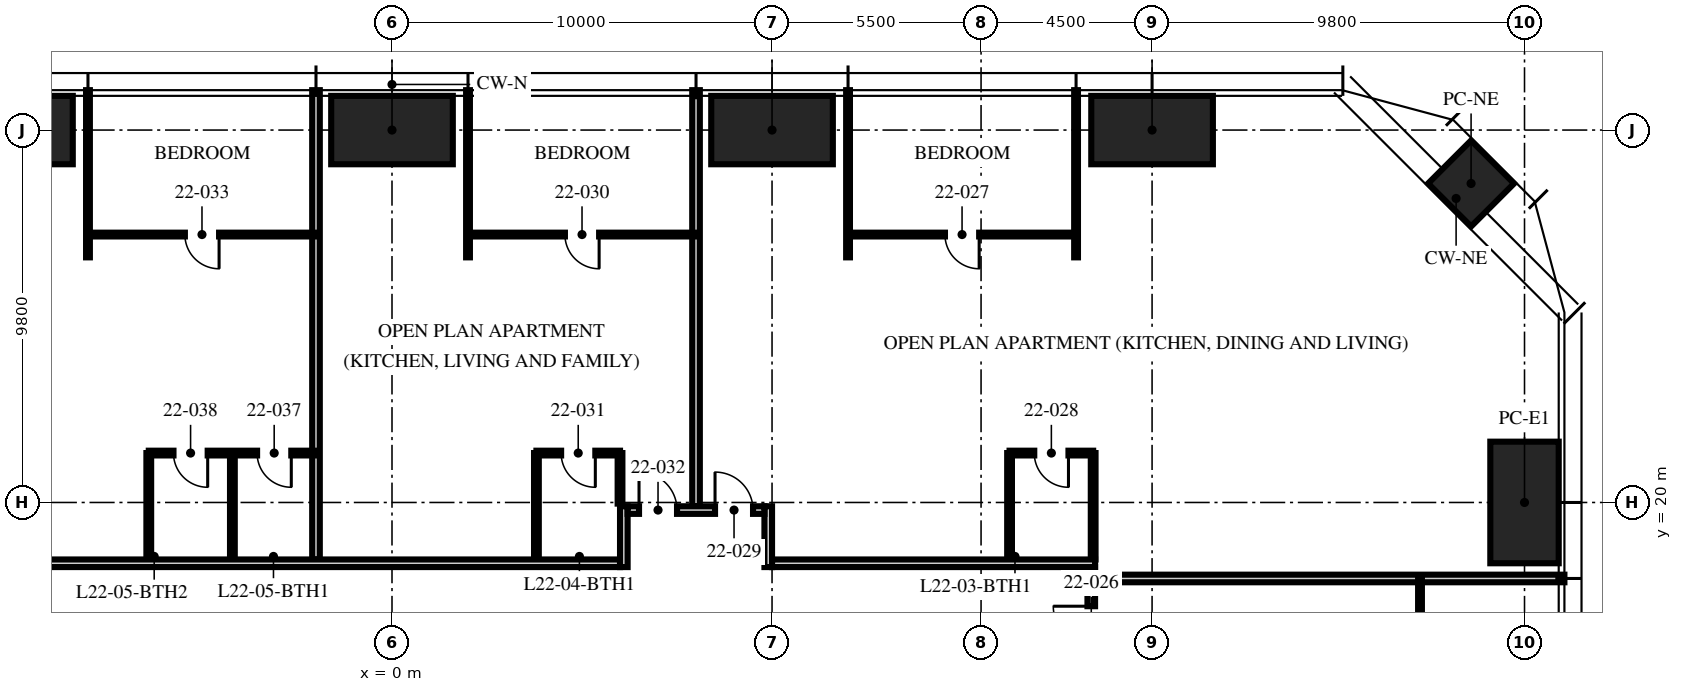
"""IFC4 building model, lengths in metres.
Left out: names, types, materials, properties, quantities, classifications, styles, units other than length and angle.
Written with IfcOpenShell. Run it as: python <this file> out.ifc"""

import sys

from ifc_helpers import new_model, si_unit, direction, frame, frame_2d, origin, origin_2d, place, context, subcontext, project, spatial, rectangle, hollow_rectangle, extrude, element, fill, save


model = new_model("IFC4")
c1 = context("Model", 3, precision=1e-05, world=origin(), true_north=direction((0.0, 1.0)))
c2 = subcontext(c1, "Body", "Model", "MODEL_VIEW")
j1 = project(units=[si_unit("LENGTHUNIT", "METRE"), si_unit("PLANEANGLEUNIT", "RADIAN")], contexts=[c1])
p1 = place(None, origin())
s1 = spatial("IfcSite", under=j1, at=p1, CompositionType="ELEMENT")
p2 = place(p1, origin())
s2 = spatial("IfcBuilding", under=s1, at=p2, CompositionType="ELEMENT")
p3 = place(p2, frame((0.0, 0.0, 88.5)))
s3 = spatial("IfcBuildingStorey", under=s2, at=p3, CompositionType="ELEMENT", Elevation=88.5)
for number, where, z_axis, x_axis in (
    (1, (-10.0, 29.8, 0.0), (0.0, 0.0, 1.0), (1.0, 0.0, 0.0)),
    (2, (0.0, 29.8, 0.0), (0.0, 0.0, 1.0), (1.0, 0.0, 0.0)),
    (3, (10.0, 29.8, 0.0), (0.0, 0.0, 1.0), (1.0, 0.0, 0.0)),
    (4, (20.0, 29.8, 0.0), (0.0, 0.0, 1.0), (1.0, 0.0, 0.0)),
    (5, (29.8, 20.0, 0.0), (0.0, 0.0, 1.0), (0.0, 1.0, 0.0)),
):
    element("IfcColumn", number, at=place(p3, frame(where, z_axis=z_axis, x_axis=x_axis)), inside=s3, PredefinedType="COLUMN", context=c2, shape_type="SweptSolid", body=[
        extrude(hollow_rectangle(XDim=3.2, YDim=1.8, WallThickness=0.2, at=origin_2d()), origin(), (0.0, 0.0, 1.0), 3.75),
    ])
p4 = place(p3, frame((28.394, 28.394, 0.0), z_axis=(0.0, 0.0, 1.0), x_axis=(0.707106781187, -0.707106781187, 0.0)))
e6 = element("IfcColumn", 6, at=p4, inside=s3, PredefinedType="COLUMN", context=c2, shape_type="SweptSolid", body=[
    extrude(hollow_rectangle(XDim=1.6, YDim=1.6, WallThickness=0.1, at=origin_2d()), origin(), (0.0, 0.0, 1.0), 3.75),
])
p5 = place(p3, frame((18.5, 18.0, 0.0), z_axis=(0.0, 0.0, 1.0), x_axis=(1.0, 0.0, 0.0)))
e7 = element("IfcWall", 7, at=p5, inside=s3, PredefinedType="PARTITIONING", context=c2, shape_type="SweptSolid", body=[
    extrude(rectangle(XDim=12.35, YDim=0.2, at=frame_2d((6.175, 0.0))), origin(), (0.0, 0.0, 1.0), 2.3),
])
for number, where, z_axis, x_axis in (
    (8, (18.0, 26.45, 0.0), (0.0, 0.0, 1.0), (0.0, 1.0, 0.0)),
    (9, (12.0, 26.45, 0.0), (0.0, 0.0, 1.0), (0.0, 1.0, 0.0)),
):
    element("IfcWall", number, at=place(p3, frame(where, z_axis=z_axis, x_axis=x_axis)), inside=s3, PredefinedType="PARTITIONING", context=c2, shape_type="SweptSolid", body=[
        extrude(rectangle(XDim=4.4, YDim=0.1, at=frame_2d((2.2, 0.0))), origin(), (0.0, 0.0, 1.0), 2.71),
    ])
p6 = place(p3, frame((8.0, 19.9, 0.0), z_axis=(0.0, 0.0, 1.0), x_axis=(0.0, 1.0, 0.0)))
e10 = element("IfcWall", 10, at=p6, inside=s3, PredefinedType="PARTITIONING", context=c2, shape_type="SweptSolid", body=[
    extrude(rectangle(XDim=10.95, YDim=0.2, at=frame_2d((5.475, 0.0))), origin(), (0.0, 0.0, 1.0), 2.71),
])
p7 = place(p3, frame((2.0, 26.45, 0.0), z_axis=(0.0, 0.0, 1.0), x_axis=(0.0, 1.0, 0.0)))
e11 = element("IfcWall", 11, at=p7, inside=s3, PredefinedType="PARTITIONING", context=c2, shape_type="SweptSolid", body=[
    extrude(rectangle(XDim=4.4, YDim=0.1, at=frame_2d((2.2, 0.0))), origin(), (0.0, 0.0, 1.0), 2.71),
])
p8 = place(p3, frame((-2.0, 18.5, 0.0), z_axis=(0.0, 0.0, 1.0), x_axis=(0.0, 1.0, 0.0)))
e12 = element("IfcWall", 12, at=p8, inside=s3, PredefinedType="PARTITIONING", context=c2, shape_type="SweptSolid", body=[
    extrude(rectangle(XDim=12.35, YDim=0.2, at=frame_2d((6.175, 0.0))), origin(), (0.0, 0.0, 1.0), 2.71),
])
p9 = place(p3, frame((-8.0, 26.45, 0.0), z_axis=(0.0, 0.0, 1.0), x_axis=(0.0, 1.0, 0.0)))
e13 = element("IfcWall", 13, at=p9, inside=s3, PredefinedType="PARTITIONING", context=c2, shape_type="SweptSolid", body=[
    extrude(rectangle(XDim=4.4, YDim=0.1, at=frame_2d((2.2, 0.0))), origin(), (0.0, 0.0, 1.0), 2.71),
])
p10 = place(p3, frame((27.05, 12.0, 0.0), z_axis=(0.0, 0.0, 1.0), x_axis=(0.0, 1.0, 0.0)))
e14 = element("IfcWall", 14, at=p10, inside=s3, PredefinedType="PARTITIONING", context=c2, shape_type="SweptSolid", body=[
    extrude(rectangle(XDim=6.0, YDim=0.1, at=frame_2d((3.0, 0.0))), origin(), (0.0, 0.0, 1.0), 2.61),
])
p11 = place(p10, frame((2.55, 0.0, 0.0)))
e15 = element("IfcOpeningElement", 15, at=p11, cuts=e14, PredefinedType="OPENING", context=c2, shape_type="SweptSolid", body=[
    extrude(rectangle(XDim=0.9, YDim=2.1, at=frame_2d((0.45, 1.05))), frame((0.0, 0.06, 0.0), z_axis=(0.0, -1.0, 0.0), x_axis=(1.0, 0.0, 0.0)), (0.0, 0.0, 1.0), 0.12),
])
p12 = place(p3, frame((18.0, 27.05, 0.0), z_axis=(0.0, 0.0, 1.0), x_axis=(-1.0, 0.0, 0.0)))
e16 = element("IfcWall", 16, at=p12, inside=s3, PredefinedType="PARTITIONING", context=c2, shape_type="SweptSolid", body=[
    extrude(rectangle(XDim=6.0, YDim=0.1, at=frame_2d((3.0, 0.0))), origin(), (0.0, 0.0, 1.0), 2.61),
])
p13 = place(p12, frame((2.55, 0.0, 0.0)))
e17 = element("IfcOpeningElement", 17, at=p13, cuts=e16, PredefinedType="OPENING", context=c2, shape_type="SweptSolid", body=[
    extrude(rectangle(XDim=0.9, YDim=2.1, at=frame_2d((0.45, 1.05))), frame((0.0, 0.06, 0.0), z_axis=(0.0, -1.0, 0.0), x_axis=(1.0, 0.0, 0.0)), (0.0, 0.0, 1.0), 0.12),
])
p14 = place(p3, frame((18.45, 21.3, 0.0), z_axis=(0.0, 0.0, 1.0), x_axis=(-1.0, 0.0, 0.0)))
e18 = element("IfcWall", 18, at=p14, inside=s3, PredefinedType="PARTITIONING", context=c2, shape_type="SweptSolid", body=[
    extrude(rectangle(XDim=2.2, YDim=0.125, at=frame_2d((1.1, 0.0))), origin(), (0.0, 0.0, 1.0), 3.5),
])
p15 = place(p14, frame((0.65, 0.0, 0.0)))
e19 = element("IfcOpeningElement", 19, at=p15, cuts=e18, PredefinedType="OPENING", context=c2, shape_type="SweptSolid", body=[
    extrude(rectangle(XDim=0.9, YDim=2.1, at=frame_2d((0.45, 1.05))), frame((0.0, 0.073, 0.0), z_axis=(0.0, -1.0, 0.0), x_axis=(1.0, 0.0, 0.0)), (0.0, 0.0, 1.0), 0.145),
])
p16 = place(p3, frame((18.45, 18.5, 0.0), z_axis=(0.0, 0.0, 1.0), x_axis=(0.0, 1.0, 0.0)))
e20 = element("IfcWall", 20, at=p16, inside=s3, PredefinedType="PARTITIONING", context=c2, shape_type="SweptSolid", body=[
    extrude(rectangle(XDim=2.8, YDim=0.125, at=frame_2d((1.4, 0.0))), origin(), (0.0, 0.0, 1.0), 2.3),
])
p17 = place(p3, frame((16.25, 18.5, 0.0), z_axis=(0.0, 0.0, 1.0), x_axis=(0.0, 1.0, 0.0)))
e21 = element("IfcWall", 21, at=p17, inside=s3, PredefinedType="PARTITIONING", context=c2, shape_type="SweptSolid", body=[
    extrude(rectangle(XDim=2.8, YDim=0.125, at=frame_2d((1.4, 0.0))), origin(), (0.0, 0.0, 1.0), 3.5),
])
p18 = place(p3, frame((8.0, 27.05, 0.0), z_axis=(0.0, 0.0, 1.0), x_axis=(-1.0, 0.0, 0.0)))
e22 = element("IfcWall", 22, at=p18, inside=s3, PredefinedType="PARTITIONING", context=c2, shape_type="SweptSolid", body=[
    extrude(rectangle(XDim=6.0, YDim=0.1, at=frame_2d((3.0, 0.0))), origin(), (0.0, 0.0, 1.0), 2.61),
])
p19 = place(p18, frame((2.55, 0.0, 0.0)))
e23 = element("IfcOpeningElement", 23, at=p19, cuts=e22, PredefinedType="OPENING", context=c2, shape_type="SweptSolid", body=[
    extrude(rectangle(XDim=0.9, YDim=2.1, at=frame_2d((0.45, 1.05))), frame((0.0, 0.06, 0.0), z_axis=(0.0, -1.0, 0.0), x_axis=(1.0, 0.0, 0.0)), (0.0, 0.0, 1.0), 0.12),
])
p20 = place(p3, frame((6.0, 21.3, 0.0), z_axis=(0.0, 0.0, 1.0), x_axis=(-1.0, 0.0, 0.0)))
e24 = element("IfcWall", 24, at=p20, inside=s3, PredefinedType="PARTITIONING", context=c2, shape_type="SweptSolid", body=[
    extrude(rectangle(XDim=2.2, YDim=0.125, at=frame_2d((1.1, 0.0))), origin(), (0.0, 0.0, 1.0), 2.61),
])
p21 = place(p20, frame((0.65, 0.0, 0.0)))
e25 = element("IfcOpeningElement", 25, at=p21, cuts=e24, PredefinedType="OPENING", context=c2, shape_type="SweptSolid", body=[
    extrude(rectangle(XDim=0.9, YDim=2.1, at=frame_2d((0.45, 1.05))), frame((0.0, 0.073, 0.0), z_axis=(0.0, -1.0, 0.0), x_axis=(1.0, 0.0, 0.0)), (0.0, 0.0, 1.0), 0.145),
])
p22 = place(p3, frame((6.0, 19.97, 0.0), z_axis=(0.0, 0.0, 1.0), x_axis=(0.0, 1.0, 0.0)))
e26 = element("IfcWall", 26, at=p22, inside=s3, PredefinedType="PARTITIONING", context=c2, shape_type="SweptSolid", body=[
    extrude(rectangle(XDim=1.33, YDim=0.125, at=frame_2d((0.665, 0.0))), origin(), (0.0, 0.0, 1.0), 3.5),
])
p23 = place(p3, frame((3.8, 18.5, 0.0), z_axis=(0.0, 0.0, 1.0), x_axis=(0.0, 1.0, 0.0)))
e27 = element("IfcWall", 27, at=p23, inside=s3, PredefinedType="PARTITIONING", context=c2, shape_type="SweptSolid", body=[
    extrude(rectangle(XDim=2.8, YDim=0.125, at=frame_2d((1.4, 0.0))), origin(), (0.0, 0.0, 1.0), 3.5),
])
p24 = place(p3, frame((-2.0, 27.05, 0.0), z_axis=(0.0, 0.0, 1.0), x_axis=(-1.0, 0.0, 0.0)))
e28 = element("IfcWall", 28, at=p24, inside=s3, PredefinedType="PARTITIONING", context=c2, shape_type="SweptSolid", body=[
    extrude(rectangle(XDim=6.0, YDim=0.1, at=frame_2d((3.0, 0.0))), origin(), (0.0, 0.0, 1.0), 2.61),
])
p25 = place(p24, frame((2.55, 0.0, 0.0)))
e29 = element("IfcOpeningElement", 29, at=p25, cuts=e28, PredefinedType="OPENING", context=c2, shape_type="SweptSolid", body=[
    extrude(rectangle(XDim=0.9, YDim=2.1, at=frame_2d((0.45, 1.05))), frame((0.0, 0.06, 0.0), z_axis=(0.0, -1.0, 0.0), x_axis=(1.0, 0.0, 0.0)), (0.0, 0.0, 1.0), 0.12),
])
p26 = place(p3, frame((-2.0, 21.3, 0.0), z_axis=(0.0, 0.0, 1.0), x_axis=(-1.0, 0.0, 0.0)))
e30 = element("IfcWall", 30, at=p26, inside=s3, PredefinedType="PARTITIONING", context=c2, shape_type="SweptSolid", body=[
    extrude(rectangle(XDim=4.4, YDim=0.125, at=frame_2d((2.2, 0.0))), origin(), (0.0, 0.0, 1.0), 2.61),
])
p27 = place(p26, frame((0.65, 0.0, 0.0)))
e31 = element("IfcOpeningElement", 31, at=p27, cuts=e30, PredefinedType="OPENING", context=c2, shape_type="SweptSolid", body=[
    extrude(rectangle(XDim=0.9, YDim=2.1, at=frame_2d((0.45, 1.05))), frame((0.0, 0.073, 0.0), z_axis=(0.0, -1.0, 0.0), x_axis=(1.0, 0.0, 0.0)), (0.0, 0.0, 1.0), 0.145),
])
p28 = place(p26, frame((2.85, 0.0, 0.0)))
e32 = element("IfcOpeningElement", 32, at=p28, cuts=e30, PredefinedType="OPENING", context=c2, shape_type="SweptSolid", body=[
    extrude(rectangle(XDim=0.9, YDim=2.1, at=frame_2d((0.45, 1.05))), frame((0.0, 0.073, 0.0), z_axis=(0.0, -1.0, 0.0), x_axis=(1.0, 0.0, 0.0)), (0.0, 0.0, 1.0), 0.145),
])
for number, where, z_axis, x_axis in (
    (33, (-4.2, 18.5, 0.0), (0.0, 0.0, 1.0), (0.0, 1.0, 0.0)),
    (34, (-6.4, 18.5, 0.0), (0.0, 0.0, 1.0), (0.0, 1.0, 0.0)),
):
    element("IfcWall", number, at=place(p3, frame(where, z_axis=z_axis, x_axis=x_axis)), inside=s3, PredefinedType="PARTITIONING", context=c2, shape_type="SweptSolid", body=[
        extrude(rectangle(XDim=2.8, YDim=0.125, at=frame_2d((1.4, 0.0))), origin(), (0.0, 0.0, 1.0), 3.5),
    ])
p29 = place(p3, frame((18.4, -6.0, 0.0), z_axis=(0.0, 0.0, 1.0), x_axis=(0.0, 1.0, 0.0)))
e35 = element("IfcWall", 35, at=p29, inside=s3, PredefinedType="PARTITIONING", context=c2, shape_type="SweptSolid", body=[
    extrude(rectangle(XDim=24.3, YDim=0.2, at=frame_2d((12.15, 0.0))), origin(), (0.0, 0.0, 1.0), 2.3),
])
p30 = place(p29, frame((22.27, 0.0, 0.0)))
e36 = element("IfcOpeningElement", 36, at=p30, cuts=e35, PredefinedType="OPENING", context=c2, shape_type="SweptSolid", body=[
    extrude(rectangle(XDim=1.0, YDim=2.2, at=frame_2d((0.5, 1.1))), frame((0.0, 0.11, 0.0), z_axis=(0.0, -1.0, 0.0), x_axis=(1.0, 0.0, 0.0)), (0.0, 0.0, 1.0), 0.22),
])
p31 = place(p3, frame((-18.5, 18.4, 0.0), z_axis=(0.0, 0.0, 1.0), x_axis=(1.0, 0.0, 0.0)))
e37 = element("IfcWall", 37, at=p31, inside=s3, PredefinedType="PARTITIONING", context=c2, shape_type="SweptSolid", body=[
    extrude(rectangle(XDim=24.5, YDim=0.2, at=frame_2d((12.25, 0.0))), origin(), (0.0, 0.0, 1.0), 2.3),
])
p32 = place(p3, frame((6.1, 18.3, 0.0), z_axis=(0.0, 0.0, 1.0), x_axis=(0.0, 1.0, 0.0)))
e38 = element("IfcWall", 38, at=p32, inside=s3, PredefinedType="PARTITIONING", context=c2, shape_type="SweptSolid", body=[
    extrude(rectangle(XDim=1.6, YDim=0.2, at=frame_2d((0.8, 0.0))), origin(), (0.0, 0.0, 1.0), 3.5),
])
p33 = place(p3, frame((9.9, 18.3, 0.0), z_axis=(0.0, 0.0, 1.0), x_axis=(0.0, 1.0, 0.0)))
e39 = element("IfcWall", 39, at=p33, inside=s3, PredefinedType="PARTITIONING", context=c2, shape_type="SweptSolid", body=[
    extrude(rectangle(XDim=1.6, YDim=0.2, at=frame_2d((0.8, 0.0))), origin(), (0.0, 0.0, 1.0), 2.492),
])
p34 = place(p3, frame((6.2, 19.8, 0.0), z_axis=(0.0, 0.0, 1.0), x_axis=(1.0, 0.0, 0.0)))
e40 = element("IfcWall", 40, at=p34, inside=s3, PredefinedType="PARTITIONING", context=c2, shape_type="SweptSolid", body=[
    extrude(rectangle(XDim=3.6, YDim=0.2, at=frame_2d((1.8, 0.0))), origin(), (0.0, 0.0, 1.0), 3.5),
])
p35 = place(p34, frame((2.3, 0.0, 0.0)))
e41 = element("IfcOpeningElement", 41, at=p35, cuts=e40, PredefinedType="OPENING", context=c2, shape_type="SweptSolid", body=[
    extrude(rectangle(XDim=1.0, YDim=2.2, at=frame_2d((0.5, 1.1))), frame((0.0, 0.11, 0.0), z_axis=(0.0, -1.0, 0.0), x_axis=(1.0, 0.0, 0.0)), (0.0, 0.0, 1.0), 0.22),
])
p36 = place(p34, frame((0.3, 0.0, 0.0)))
e42 = element("IfcOpeningElement", 42, at=p36, cuts=e40, PredefinedType="OPENING", context=c2, shape_type="SweptSolid", body=[
    extrude(rectangle(XDim=1.0, YDim=2.2, at=frame_2d((0.5, 1.1))), frame((0.0, 0.11, 0.0), z_axis=(0.0, -1.0, 0.0), x_axis=(1.0, 0.0, 0.0)), (0.0, 0.0, 1.0), 0.22),
])
p37 = place(p3, frame((10.0, 18.4, 0.0), z_axis=(0.0, 0.0, 1.0), x_axis=(1.0, 0.0, 0.0)))
e43 = element("IfcWall", 43, at=p37, inside=s3, PredefinedType="PARTITIONING", context=c2, shape_type="SweptSolid", body=[
    extrude(rectangle(XDim=8.5, YDim=0.2, at=frame_2d((4.25, 0.0))), origin(), (0.0, 0.0, 1.0), 2.3),
])
p38 = place(p30, origin())
e44 = element("IfcDoor", 44, at=p38, inside=s3, OperationType="SINGLE_SWING_RIGHT", PredefinedType="DOOR", context=c2, shape_type="SweptSolid", body=[
    extrude(rectangle(XDim=1.0, YDim=2.2, at=frame_2d((0.5, 1.1))), frame((0.0, 0.025, 0.0), z_axis=(0.0, -1.0, 0.0), x_axis=(1.0, 0.0, 0.0)), (0.0, 0.0, 1.0), 0.05),
])
fill(e36, e44)
p39 = place(p13, origin())
e45 = element("IfcDoor", 45, at=p39, inside=s3, OperationType="SINGLE_SWING_LEFT", PredefinedType="DOOR", context=c2, shape_type="SweptSolid", body=[
    extrude(rectangle(XDim=0.9, YDim=2.1, at=frame_2d((0.45, 1.05))), frame((0.0, 0.025, 0.0), z_axis=(0.0, -1.0, 0.0), x_axis=(1.0, 0.0, 0.0)), (0.0, 0.0, 1.0), 0.05),
])
fill(e17, e45)
p40 = place(p15, origin())
e46 = element("IfcDoor", 46, at=p40, inside=s3, OperationType="SINGLE_SWING_LEFT", PredefinedType="DOOR", context=c2, shape_type="SweptSolid", body=[
    extrude(rectangle(XDim=0.9, YDim=2.1, at=frame_2d((0.45, 1.05))), frame((0.0, 0.025, 0.0), z_axis=(0.0, -1.0, 0.0), x_axis=(1.0, 0.0, 0.0)), (0.0, 0.0, 1.0), 0.05),
])
fill(e19, e46)
p41 = place(p35, origin())
e47 = element("IfcDoor", 47, at=p41, inside=s3, OperationType="SINGLE_SWING_LEFT", PredefinedType="DOOR", context=c2, shape_type="SweptSolid", body=[
    extrude(rectangle(XDim=1.0, YDim=2.2, at=frame_2d((0.5, 1.1))), frame((0.0, 0.025, 0.0), z_axis=(0.0, -1.0, 0.0), x_axis=(1.0, 0.0, 0.0)), (0.0, 0.0, 1.0), 0.05),
])
fill(e41, e47)
p42 = place(p19, origin())
e48 = element("IfcDoor", 48, at=p42, inside=s3, OperationType="SINGLE_SWING_LEFT", PredefinedType="DOOR", context=c2, shape_type="SweptSolid", body=[
    extrude(rectangle(XDim=0.9, YDim=2.1, at=frame_2d((0.45, 1.05))), frame((0.0, 0.025, 0.0), z_axis=(0.0, -1.0, 0.0), x_axis=(1.0, 0.0, 0.0)), (0.0, 0.0, 1.0), 0.05),
])
fill(e23, e48)
p43 = place(p21, origin())
e49 = element("IfcDoor", 49, at=p43, inside=s3, OperationType="SINGLE_SWING_LEFT", PredefinedType="DOOR", context=c2, shape_type="SweptSolid", body=[
    extrude(rectangle(XDim=0.9, YDim=2.1, at=frame_2d((0.45, 1.05))), frame((0.0, 0.025, 0.0), z_axis=(0.0, -1.0, 0.0), x_axis=(1.0, 0.0, 0.0)), (0.0, 0.0, 1.0), 0.05),
])
fill(e25, e49)
p44 = place(p36, origin())
e50 = element("IfcDoor", 50, at=p44, inside=s3, OperationType="SINGLE_SWING_LEFT", PredefinedType="DOOR", context=c2, shape_type="SweptSolid", body=[
    extrude(rectangle(XDim=1.0, YDim=2.2, at=frame_2d((0.5, 1.1))), frame((0.0, 0.025, 0.0), z_axis=(0.0, -1.0, 0.0), x_axis=(1.0, 0.0, 0.0)), (0.0, 0.0, 1.0), 0.05),
])
fill(e42, e50)
p45 = place(p25, origin())
e51 = element("IfcDoor", 51, at=p45, inside=s3, OperationType="SINGLE_SWING_LEFT", PredefinedType="DOOR", context=c2, shape_type="SweptSolid", body=[
    extrude(rectangle(XDim=0.9, YDim=2.1, at=frame_2d((0.45, 1.05))), frame((0.0, 0.025, 0.0), z_axis=(0.0, -1.0, 0.0), x_axis=(1.0, 0.0, 0.0)), (0.0, 0.0, 1.0), 0.05),
])
fill(e29, e51)
p46 = place(p27, origin())
e52 = element("IfcDoor", 52, at=p46, inside=s3, OperationType="SINGLE_SWING_LEFT", PredefinedType="DOOR", context=c2, shape_type="SweptSolid", body=[
    extrude(rectangle(XDim=0.9, YDim=2.1, at=frame_2d((0.45, 1.05))), frame((0.0, 0.025, 0.0), z_axis=(0.0, -1.0, 0.0), x_axis=(1.0, 0.0, 0.0)), (0.0, 0.0, 1.0), 0.05),
])
fill(e31, e52)
p47 = place(p28, origin())
e53 = element("IfcDoor", 53, at=p47, inside=s3, OperationType="SINGLE_SWING_LEFT", PredefinedType="DOOR", context=c2, shape_type="SweptSolid", body=[
    extrude(rectangle(XDim=0.9, YDim=2.1, at=frame_2d((0.45, 1.05))), frame((0.0, 0.025, 0.0), z_axis=(0.0, -1.0, 0.0), x_axis=(1.0, 0.0, 0.0)), (0.0, 0.0, 1.0), 0.05),
])
fill(e32, e53)
save(model, sys.argv[1])
